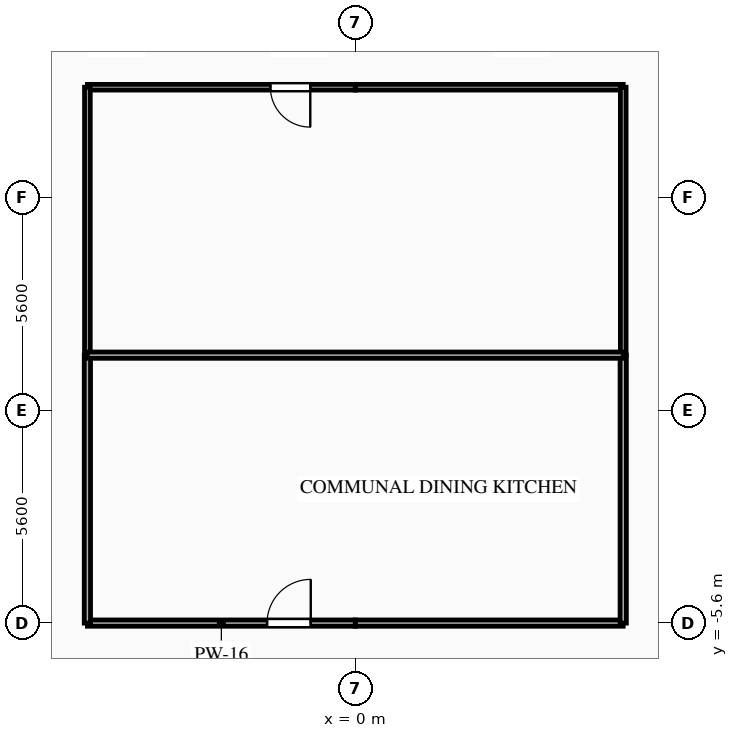
"""IFC4 building model, lengths in metres.
Left out: names, types, materials, properties, quantities, classifications, styles, units other than length and angle.
Written with IfcOpenShell. Run it as: python <this file> out.ifc"""

import sys

from ifc_helpers import new_model, si_unit, direction, frame, frame_2d, origin, place, context, subcontext, project, spatial, rectangle, extrude, element, fill, save


model = new_model("IFC4")
c1 = context("Model", 3, precision=1e-05, world=origin(), true_north=direction((0.0, 1.0)))
c2 = subcontext(c1, "Body", "Model", "MODEL_VIEW")
j1 = project(units=[si_unit("LENGTHUNIT", "METRE"), si_unit("PLANEANGLEUNIT", "RADIAN")], contexts=[c1])
p1 = place(None, origin())
s1 = spatial("IfcSite", under=j1, at=p1, CompositionType="ELEMENT")
p2 = place(p1, origin())
s2 = spatial("IfcBuilding", under=s1, at=p2, CompositionType="ELEMENT")
p3 = place(p2, frame((0.0, 0.0, 60.5)))
s3 = spatial("IfcBuildingStorey", under=s2, at=p3, CompositionType="ELEMENT", Elevation=60.5)
p4 = place(p3, frame((0.0, 8.5, 0.0), z_axis=(0.0, 0.0, 1.0), x_axis=(-1.0, 0.0, 0.0)))
e1 = element("IfcWall", 1, at=p4, inside=s3, PredefinedType="PARTITIONING", context=c2, shape_type="SweptSolid", body=[
    extrude(rectangle(XDim=7.05, YDim=0.15, at=frame_2d((3.525, 0.0))), origin(), (0.0, 0.0, 1.0), 3.035),
])
p5 = place(p4, frame((1.185, 0.0, 0.0)))
e2 = element("IfcOpeningElement", 2, at=p5, cuts=e1, PredefinedType="OPENING", context=c2, shape_type="SweptSolid", body=[
    extrude(rectangle(XDim=1.05, YDim=2.15, at=frame_2d((0.525, 1.075))), frame((0.0, 0.085, 0.0), z_axis=(0.0, -1.0, 0.0), x_axis=(1.0, 0.0, 0.0)), (0.0, 0.0, 1.0), 0.17),
])
p6 = place(p3, frame((7.05, 8.5, 0.0), z_axis=(0.0, 0.0, 1.0), x_axis=(-1.0, 0.0, 0.0)))
e3 = element("IfcWall", 3, at=p6, inside=s3, PredefinedType="PARTITIONING", context=c2, shape_type="SweptSolid", body=[
    extrude(rectangle(XDim=7.05, YDim=0.15, at=frame_2d((3.525, 0.0))), origin(), (0.0, 0.0, 1.0), 3.035),
])
p7 = place(p3, frame((-7.05, -5.6, 0.0), z_axis=(0.0, 0.0, 1.0), x_axis=(1.0, 0.0, 0.0)))
e4 = element("IfcWall", 4, at=p7, inside=s3, PredefinedType="PARTITIONING", context=c2, shape_type="SweptSolid", body=[
    extrude(rectangle(XDim=7.05, YDim=0.165, at=frame_2d((3.525, 0.0))), origin(), (0.0, 0.0, 1.0), 2.52),
])
p8 = place(p7, frame((4.728, 0.0, 0.0)))
e5 = element("IfcOpeningElement", 5, at=p8, cuts=e4, PredefinedType="OPENING", context=c2, shape_type="SweptSolid", body=[
    extrude(rectangle(XDim=1.15, YDim=2.15, at=frame_2d((0.575, 1.075))), frame((0.0, 0.093, 0.0), z_axis=(0.0, -1.0, 0.0), x_axis=(1.0, 0.0, 0.0)), (0.0, 0.0, 1.0), 0.185),
])
p9 = place(p3, frame((0.0, -5.6, 0.0), z_axis=(0.0, 0.0, 1.0), x_axis=(1.0, 0.0, 0.0)))
e6 = element("IfcWall", 6, at=p9, inside=s3, PredefinedType="PARTITIONING", context=c2, shape_type="SweptSolid", body=[
    extrude(rectangle(XDim=7.05, YDim=0.165, at=frame_2d((3.525, 0.0))), origin(), (0.0, 0.0, 1.0), 2.52),
])
p10 = place(p3, frame((-7.05, 1.45, 0.0), z_axis=(0.0, 0.0, 1.0), x_axis=(0.0, -1.0, 0.0)))
e7 = element("IfcWall", 7, at=p10, inside=s3, PredefinedType="PARTITIONING", context=c2, shape_type="SweptSolid", body=[
    extrude(rectangle(XDim=7.05, YDim=0.165, at=frame_2d((3.525, 0.0))), origin(), (0.0, 0.0, 1.0), 3.035),
])
p11 = place(p3, frame((-7.05, 8.5, 0.0), z_axis=(0.0, 0.0, 1.0), x_axis=(0.0, -1.0, 0.0)))
e8 = element("IfcWall", 8, at=p11, inside=s3, PredefinedType="PARTITIONING", context=c2, shape_type="SweptSolid", body=[
    extrude(rectangle(XDim=7.05, YDim=0.15, at=frame_2d((3.525, 0.0))), origin(), (0.0, 0.0, 1.0), 3.035),
])
p12 = place(p3, frame((7.05, -5.6, 0.0), z_axis=(0.0, 0.0, 1.0), x_axis=(0.0, 1.0, 0.0)))
e9 = element("IfcWall", 9, at=p12, inside=s3, PredefinedType="PARTITIONING", context=c2, shape_type="SweptSolid", body=[
    extrude(rectangle(XDim=7.05, YDim=0.165, at=frame_2d((3.525, 0.0))), origin(), (0.0, 0.0, 1.0), 3.035),
])
p13 = place(p3, frame((7.05, 1.45, 0.0), z_axis=(0.0, 0.0, 1.0), x_axis=(0.0, 1.0, 0.0)))
e10 = element("IfcWall", 10, at=p13, inside=s3, PredefinedType="PARTITIONING", context=c2, shape_type="SweptSolid", body=[
    extrude(rectangle(XDim=7.05, YDim=0.15, at=frame_2d((3.525, 0.0))), origin(), (0.0, 0.0, 1.0), 3.035),
])
p14 = place(p3, frame((-7.05, 1.45, 0.0), z_axis=(0.0, 0.0, 1.0), x_axis=(1.0, 0.0, 0.0)))
e11 = element("IfcWall", 11, at=p14, inside=s3, PredefinedType="PARTITIONING", context=c2, shape_type="SweptSolid", body=[
    extrude(rectangle(XDim=14.1, YDim=0.165, at=frame_2d((7.05, 0.0))), origin(), (0.0, 0.0, 1.0), 3.035),
])
p15 = place(p5, origin())
e12 = element("IfcDoor", 12, at=p15, inside=s3, OperationType="SINGLE_SWING_LEFT", PredefinedType="DOOR", context=c2, shape_type="SweptSolid", body=[
    extrude(rectangle(XDim=1.05, YDim=2.15, at=frame_2d((0.525, 1.075))), frame((0.0, 0.025, 0.0), z_axis=(0.0, -1.0, 0.0), x_axis=(1.0, 0.0, 0.0)), (0.0, 0.0, 1.0), 0.05),
])
fill(e2, e12)
p16 = place(p8, origin())
e13 = element("IfcDoor", 13, at=p16, inside=s3, OperationType="SINGLE_SWING_RIGHT", PredefinedType="DOOR", context=c2, shape_type="SweptSolid", body=[
    extrude(rectangle(XDim=1.15, YDim=2.15, at=frame_2d((0.575, 1.075))), frame((0.0, 0.025, 0.0), z_axis=(0.0, -1.0, 0.0), x_axis=(1.0, 0.0, 0.0)), (0.0, 0.0, 1.0), 0.05),
])
fill(e5, e13)
save(model, sys.argv[1])
